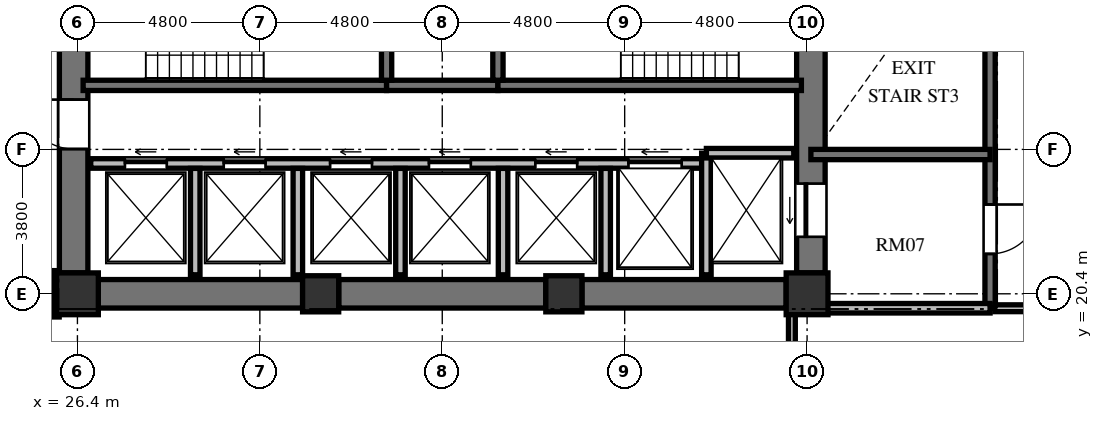
"""IFC4 building model, lengths in metres.
Left out: names, types, materials, properties, quantities, classifications, styles, units other than length and angle.
Written with IfcOpenShell. Run it as: python <this file> out.ifc"""

import sys

from ifc_helpers import new_model, si_unit, direction, frame, frame_2d, origin, origin_2d, place, context, subcontext, project, spatial, rectangle, extrude, element, fill, save


model = new_model("IFC4")
c1 = context("Model", 3, precision=1e-05, world=origin(), true_north=direction((0.0, 1.0)))
c2 = subcontext(c1, "Body", "Model", "MODEL_VIEW")
j1 = project(units=[si_unit("LENGTHUNIT", "METRE"), si_unit("PLANEANGLEUNIT", "RADIAN")], contexts=[c1])
p1 = place(None, origin())
s1 = spatial("IfcSite", under=j1, at=p1, CompositionType="ELEMENT")
p2 = place(p1, origin())
s2 = spatial("IfcBuilding", under=s1, at=p2, CompositionType="ELEMENT")
p3 = place(p2, frame((0.0, 0.0, 96.336)))
s3 = spatial("IfcBuildingStorey", under=s2, at=p3, CompositionType="ELEMENT", Elevation=96.336)
p4 = place(p3, frame((26.4, 20.4, 0.0), z_axis=(0.0, 0.0, 1.0), x_axis=(1.0, 0.0, 0.0)))
e1 = element("IfcColumn", 1, at=p4, inside=s3, PredefinedType="COLUMN", context=c2, shape_type="SweptSolid", body=[
    extrude(rectangle(XDim=1.1, YDim=1.1, at=origin_2d()), origin(), (0.0, 0.0, 1.0), 3.648),
])
for number, where, z_axis, x_axis in (
    (2, (32.8, 20.4, 0.0), (0.0, 0.0, 1.0), (1.0, 0.0, 0.0)),
    (3, (39.2, 20.4, 0.0), (0.0, 0.0, 1.0), (1.0, 0.0, 0.0)),
):
    element("IfcColumn", number, at=place(p3, frame(where, z_axis=z_axis, x_axis=x_axis)), inside=s3, PredefinedType="COLUMN", context=c2, shape_type="SweptSolid", body=[
        extrude(rectangle(XDim=0.95, YDim=0.95, at=origin_2d()), origin(), (0.0, 0.0, 1.0), 3.648),
    ])
p5 = place(p3, frame((45.6, 20.4, 0.0), z_axis=(0.0, 0.0, 1.0), x_axis=(1.0, 0.0, 0.0)))
e4 = element("IfcColumn", 4, at=p5, inside=s3, PredefinedType="COLUMN", context=c2, shape_type="SweptSolid", body=[
    extrude(rectangle(XDim=1.1, YDim=1.1, at=origin_2d()), origin(), (0.0, 0.0, 1.0), 3.648),
])
p6 = place(p3, frame((26.3, 20.95, 0.0), z_axis=(0.0, 0.0, 1.0), x_axis=(0.0, 1.0, 0.0)))
e5 = element("IfcWall", 5, at=p6, inside=s3, PredefinedType="SHEAR", context=c2, shape_type="SweptSolid", body=[
    extrude(rectangle(XDim=14.1, YDim=0.75, at=frame_2d((7.05, 0.0))), origin(), (0.0, 0.0, 1.0), 3.648),
])
p7 = place(p6, frame((6.5, 0.0, 0.0)))
e6 = element("IfcOpeningElement", 6, at=p7, cuts=e5, PredefinedType="OPENING", context=c2, shape_type="SweptSolid", body=[
    extrude(rectangle(XDim=1.2, YDim=2.15, at=frame_2d((0.6, 1.075))), frame((0.0, 0.385, 0.0), z_axis=(0.0, -1.0, 0.0), x_axis=(1.0, 0.0, 0.0)), (0.0, 0.0, 1.0), 0.77),
])
p8 = place(p6, frame((9.6, 0.0, 0.0)))
e7 = element("IfcOpeningElement", 7, at=p8, cuts=e5, PredefinedType="OPENING", context=c2, shape_type="SweptSolid", body=[
    extrude(rectangle(XDim=1.3, YDim=2.2, at=frame_2d((0.65, 1.1))), frame((0.0, 0.385, 0.0), z_axis=(0.0, -1.0, 0.0), x_axis=(1.0, 0.0, 0.0)), (0.0, 0.0, 1.0), 0.77),
])
p9 = place(p6, frame((3.26, 0.0, 0.0)))
e8 = element("IfcOpeningElement", 8, at=p9, cuts=e5, PredefinedType="OPENING", context=c2, shape_type="SweptSolid", body=[
    extrude(rectangle(XDim=1.3, YDim=2.2, at=frame_2d((0.65, 1.1))), frame((0.0, 0.385, 0.0), z_axis=(0.0, -1.0, 0.0), x_axis=(1.0, 0.0, 0.0)), (0.0, 0.0, 1.0), 0.77),
])
p10 = place(p3, frame((45.7, 20.95, 0.0), z_axis=(0.0, 0.0, 1.0), x_axis=(0.0, 1.0, 0.0)))
e9 = element("IfcWall", 9, at=p10, inside=s3, PredefinedType="SHEAR", context=c2, shape_type="SweptSolid", body=[
    extrude(rectangle(XDim=14.1, YDim=0.75, at=frame_2d((7.05, 0.0))), origin(), (0.0, 0.0, 1.0), 3.648),
])
p11 = place(p10, frame((11.75, 0.0, 0.0)))
e10 = element("IfcOpeningElement", 10, at=p11, cuts=e9, PredefinedType="OPENING", context=c2, shape_type="SweptSolid", body=[
    extrude(rectangle(XDim=1.4, YDim=2.3, at=frame_2d((0.7, 1.15))), frame((0.0, 0.385, 0.0), z_axis=(0.0, -1.0, 0.0), x_axis=(1.0, 0.0, 0.0)), (0.0, 0.0, 1.0), 0.77),
])
p12 = place(p10, frame((0.95, 0.0, 0.0)))
e11 = element("IfcOpeningElement", 11, at=p12, cuts=e9, PredefinedType="OPENING", context=c2, shape_type="SweptSolid", body=[
    extrude(rectangle(XDim=1.4, YDim=2.3, at=frame_2d((0.7, 1.15))), frame((0.0, 0.385, 0.0), z_axis=(0.0, -1.0, 0.0), x_axis=(1.0, 0.0, 0.0)), (0.0, 0.0, 1.0), 0.77),
])
p13 = place(p3, frame((26.95, 20.4, 0.0), z_axis=(0.0, 0.0, 1.0), x_axis=(1.0, 0.0, 0.0)))
e12 = element("IfcWall", 12, at=p13, inside=s3, PredefinedType="SHEAR", context=c2, shape_type="SweptSolid", body=[
    extrude(rectangle(XDim=5.375, YDim=0.75, at=frame_2d((2.688, 0.0))), origin(), (0.0, 0.0, 1.0), 3.648),
])
p14 = place(p3, frame((33.275, 20.4, 0.0), z_axis=(0.0, 0.0, 1.0), x_axis=(1.0, 0.0, 0.0)))
e13 = element("IfcWall", 13, at=p14, inside=s3, PredefinedType="SHEAR", context=c2, shape_type="SweptSolid", body=[
    extrude(rectangle(XDim=5.45, YDim=0.75, at=frame_2d((2.725, 0.0))), origin(), (0.0, 0.0, 1.0), 3.648),
])
p15 = place(p3, frame((39.675, 20.4, 0.0), z_axis=(0.0, 0.0, 1.0), x_axis=(1.0, 0.0, 0.0)))
e14 = element("IfcWall", 14, at=p15, inside=s3, PredefinedType="SHEAR", context=c2, shape_type="SweptSolid", body=[
    extrude(rectangle(XDim=5.375, YDim=0.75, at=frame_2d((2.688, 0.0))), origin(), (0.0, 0.0, 1.0), 3.648),
])
p16 = place(p3, frame((26.55, 25.885, 0.0), z_axis=(0.0, 0.0, 1.0), x_axis=(1.0, 0.0, 0.0)))
e15 = element("IfcWall", 15, at=p16, inside=s3, PredefinedType="SHEAR", context=c2, shape_type="SweptSolid", body=[
    extrude(rectangle(XDim=7.985, YDim=0.27, at=frame_2d((3.992, 0.0))), origin(), (0.0, 0.0, 1.0), 3.648),
])
p17 = place(p3, frame((34.535, 25.885, 0.0), z_axis=(0.0, 0.0, 1.0), x_axis=(1.0, 0.0, 0.0)))
e16 = element("IfcWall", 16, at=p17, inside=s3, PredefinedType="SHEAR", context=c2, shape_type="SweptSolid", body=[
    extrude(rectangle(XDim=2.93, YDim=0.27, at=frame_2d((1.465, 0.0))), origin(), (0.0, 0.0, 1.0), 3.648),
])
p18 = place(p3, frame((37.465, 25.885, 0.0), z_axis=(0.0, 0.0, 1.0), x_axis=(1.0, 0.0, 0.0)))
e17 = element("IfcWall", 17, at=p18, inside=s3, PredefinedType="SHEAR", context=c2, shape_type="SweptSolid", body=[
    extrude(rectangle(XDim=7.985, YDim=0.27, at=frame_2d((3.992, 0.0))), origin(), (0.0, 0.0, 1.0), 3.648),
])
for number, where, z_axis, x_axis in (
    (18, (34.535, 26.02, 0.0), (0.0, 0.0, 1.0), (0.0, 1.0, 0.0)),
    (19, (37.465, 26.02, 0.0), (0.0, 0.0, 1.0), (0.0, 1.0, 0.0)),
):
    element("IfcWall", number, at=place(p3, frame(where, z_axis=z_axis, x_axis=x_axis)), inside=s3, PredefinedType="SHEAR", context=c2, shape_type="SweptSolid", body=[
        extrude(rectangle(XDim=4.08, YDim=0.27, at=frame_2d((2.04, 0.0))), origin(), (0.0, 0.0, 1.0), 3.648),
    ])
p19 = place(p3, frame((26.75, 23.83, 0.0), z_axis=(0.0, 0.0, 1.0), x_axis=(1.0, 0.0, 0.0)))
e20 = element("IfcWall", 20, at=p19, inside=s3, PredefinedType="SOLIDWALL", context=c2, shape_type="SweptSolid", body=[
    extrude(rectangle(XDim=16.2, YDim=0.25, at=frame_2d((8.1, 0.0))), origin(), (0.0, 0.0, 1.0), 3.428),
])
p20 = place(p19, frame((0.9, 0.0, 0.0)))
e21 = element("IfcOpeningElement", 21, at=p20, cuts=e20, PredefinedType="OPENING", context=c2, shape_type="SweptSolid", body=[
    extrude(rectangle(XDim=1.1, YDim=2.2, at=frame_2d((0.55, 1.1))), frame((0.0, 0.135, 0.0), z_axis=(0.0, -1.0, 0.0), x_axis=(1.0, 0.0, 0.0)), (0.0, 0.0, 1.0), 0.27),
])
p21 = place(p19, frame((3.5, 0.0, 0.0)))
e22 = element("IfcOpeningElement", 22, at=p21, cuts=e20, PredefinedType="OPENING", context=c2, shape_type="SweptSolid", body=[
    extrude(rectangle(XDim=1.1, YDim=2.2, at=frame_2d((0.55, 1.1))), frame((0.0, 0.135, 0.0), z_axis=(0.0, -1.0, 0.0), x_axis=(1.0, 0.0, 0.0)), (0.0, 0.0, 1.0), 0.27),
])
p22 = place(p19, frame((6.3, 0.0, 0.0)))
e23 = element("IfcOpeningElement", 23, at=p22, cuts=e20, PredefinedType="OPENING", context=c2, shape_type="SweptSolid", body=[
    extrude(rectangle(XDim=1.1, YDim=2.2, at=frame_2d((0.55, 1.1))), frame((0.0, 0.135, 0.0), z_axis=(0.0, -1.0, 0.0), x_axis=(1.0, 0.0, 0.0)), (0.0, 0.0, 1.0), 0.27),
])
p23 = place(p19, frame((8.9, 0.0, 0.0)))
e24 = element("IfcOpeningElement", 24, at=p23, cuts=e20, PredefinedType="OPENING", context=c2, shape_type="SweptSolid", body=[
    extrude(rectangle(XDim=1.1, YDim=2.2, at=frame_2d((0.55, 1.1))), frame((0.0, 0.135, 0.0), z_axis=(0.0, -1.0, 0.0), x_axis=(1.0, 0.0, 0.0)), (0.0, 0.0, 1.0), 0.27),
])
p24 = place(p19, frame((11.7, 0.0, 0.0)))
e25 = element("IfcOpeningElement", 25, at=p24, cuts=e20, PredefinedType="OPENING", context=c2, shape_type="SweptSolid", body=[
    extrude(rectangle(XDim=1.1, YDim=2.2, at=frame_2d((0.55, 1.1))), frame((0.0, 0.135, 0.0), z_axis=(0.0, -1.0, 0.0), x_axis=(1.0, 0.0, 0.0)), (0.0, 0.0, 1.0), 0.27),
])
p25 = place(p19, frame((14.15, 0.0, 0.0)))
e26 = element("IfcOpeningElement", 26, at=p25, cuts=e20, PredefinedType="OPENING", context=c2, shape_type="SweptSolid", body=[
    extrude(rectangle(XDim=1.4, YDim=2.3, at=frame_2d((0.7, 1.15))), frame((0.0, 0.135, 0.0), z_axis=(0.0, -1.0, 0.0), x_axis=(1.0, 0.0, 0.0)), (0.0, 0.0, 1.0), 0.27),
])
p26 = place(p3, frame((42.95, 20.9, 0.0), z_axis=(0.0, 0.0, 1.0), x_axis=(0.0, 1.0, 0.0)))
e27 = element("IfcWall", 27, at=p26, inside=s3, PredefinedType="SOLIDWALL", context=c2, shape_type="SweptSolid", body=[
    extrude(rectangle(XDim=3.2, YDim=0.25, at=frame_2d((1.6, 0.0))), origin(), (0.0, 0.0, 1.0), 3.428),
])
p27 = place(p3, frame((42.95, 24.1, 0.0), z_axis=(0.0, 0.0, 1.0), x_axis=(1.0, 0.0, 0.0)))
e28 = element("IfcWall", 28, at=p27, inside=s3, PredefinedType="SOLIDWALL", context=c2, shape_type="SweptSolid", body=[
    extrude(rectangle(XDim=2.3, YDim=0.25, at=frame_2d((1.15, 0.0))), origin(), (0.0, 0.0, 1.0), 3.428),
])
for number, where, z_axis, x_axis in (
    (29, (29.5, 20.9, 0.0), (0.0, 0.0, 1.0), (0.0, 1.0, 0.0)),
    (30, (32.2, 20.9, 0.0), (0.0, 0.0, 1.0), (0.0, 1.0, 0.0)),
    (31, (34.9, 20.9, 0.0), (0.0, 0.0, 1.0), (0.0, 1.0, 0.0)),
    (32, (37.6, 20.9, 0.0), (0.0, 0.0, 1.0), (0.0, 1.0, 0.0)),
    (33, (40.3, 20.9, 0.0), (0.0, 0.0, 1.0), (0.0, 1.0, 0.0)),
):
    element("IfcWall", number, at=place(p3, frame(where, z_axis=z_axis, x_axis=x_axis)), inside=s3, PredefinedType="SOLIDWALL", context=c2, shape_type="SweptSolid", body=[
        extrude(rectangle(XDim=2.8, YDim=0.25, at=frame_2d((1.4, 0.0))), origin(), (0.0, 0.0, 1.0), 3.428),
    ])
p28 = place(p3, frame((50.415, 35.845, 0.0), z_axis=(0.0, 0.0, 1.0), x_axis=(0.0, -1.0, 0.0)))
e34 = element("IfcWall", 34, at=p28, inside=s3, PredefinedType="SHEAR", context=c2, shape_type="SweptSolid", body=[
    extrude(rectangle(XDim=15.825, YDim=0.27, at=frame_2d((7.913, 0.0))), origin(), (0.0, 0.0, 1.0), 3.648),
])
p29 = place(p28, frame((4.445, 0.0, 0.0)))
e35 = element("IfcOpeningElement", 35, at=p29, cuts=e34, PredefinedType="OPENING", context=c2, shape_type="SweptSolid", body=[
    extrude(rectangle(XDim=1.2, YDim=2.15, at=frame_2d((0.6, 1.075))), frame((0.0, 0.145, 0.0), z_axis=(0.0, -1.0, 0.0), x_axis=(1.0, 0.0, 0.0)), (0.0, 0.0, 1.0), 0.29),
])
p30 = place(p28, frame((1.295, 0.0, 0.0)))
e36 = element("IfcOpeningElement", 36, at=p30, cuts=e34, PredefinedType="OPENING", context=c2, shape_type="SweptSolid", body=[
    extrude(rectangle(XDim=1.3, YDim=2.2, at=frame_2d((0.65, 1.1))), frame((0.0, 0.145, 0.0), z_axis=(0.0, -1.0, 0.0), x_axis=(1.0, 0.0, 0.0)), (0.0, 0.0, 1.0), 0.29),
])
p31 = place(p28, frame((13.095, 0.0, 0.0)))
e37 = element("IfcOpeningElement", 37, at=p31, cuts=e34, PredefinedType="OPENING", context=c2, shape_type="SweptSolid", body=[
    extrude(rectangle(XDim=1.3, YDim=2.2, at=frame_2d((0.65, 1.1))), frame((0.0, 0.145, 0.0), z_axis=(0.0, -1.0, 0.0), x_axis=(1.0, 0.0, 0.0)), (0.0, 0.0, 1.0), 0.29),
])
p32 = place(p3, frame((45.7, 24.065, 0.0), z_axis=(0.0, 0.0, 1.0), x_axis=(1.0, 0.0, 0.0)))
e38 = element("IfcWall", 38, at=p32, inside=s3, PredefinedType="SHEAR", context=c2, shape_type="SweptSolid", body=[
    extrude(rectangle(XDim=4.715, YDim=0.27, at=frame_2d((2.357, 0.0))), origin(), (0.0, 0.0, 1.0), 3.648),
])
p33 = place(p3, frame((45.7, 20.02, 0.0), z_axis=(0.0, 0.0, 1.0), x_axis=(1.0, 0.0, 0.0)))
e39 = element("IfcWall", 39, at=p33, inside=s3, PredefinedType="SOLIDWALL", context=c2, shape_type="SweptSolid", body=[
    extrude(rectangle(XDim=4.715, YDim=0.25, at=frame_2d((2.357, 0.0))), origin(), (0.0, 0.0, 1.0), 3.428),
])
p34 = place(p3, frame((53.19, 20.02, 0.0), z_axis=(0.0, 0.0, 1.0), x_axis=(-1.0, 0.0, 0.0)))
e40 = element("IfcWall", 40, at=p34, inside=s3, PredefinedType="PARTITIONING", context=c2, shape_type="SweptSolid", body=[
    extrude(rectangle(XDim=2.65, YDim=0.18, at=frame_2d((1.325, 0.0))), origin(), (0.0, 0.0, 1.0), 3.428),
])
p35 = place(p3, frame((25.83, 21.01, 0.0), z_axis=(0.0, 0.0, 1.0), x_axis=(0.0, -1.0, 0.0)))
e41 = element("IfcWall", 41, at=p35, inside=s3, PredefinedType="PARTITIONING", context=c2, shape_type="SweptSolid", body=[
    extrude(rectangle(XDim=1.22, YDim=0.18, at=frame_2d((0.61, 0.0))), origin(), (0.0, 0.0, 1.0), 3.428),
])
p36 = place(p3, frame((45.2, 19.91, 0.0), z_axis=(0.0, 0.0, 1.0), x_axis=(0.0, -1.0, 0.0)))
e42 = element("IfcWall", 42, at=p36, inside=s3, PredefinedType="PARTITIONING", context=c2, shape_type="SweptSolid", body=[
    extrude(rectangle(XDim=2.55, YDim=0.18, at=frame_2d((1.275, 0.0))), origin(), (0.0, 0.0, 1.0), 3.428),
])
p37 = place(p9, origin())
e43 = element("IfcDoor", 43, at=p37, inside=s3, OperationType="SINGLE_SWING_RIGHT", PredefinedType="DOOR", context=c2, shape_type="SweptSolid", body=[
    extrude(rectangle(XDim=1.3, YDim=2.2, at=frame_2d((0.65, 1.1))), frame((0.0, 0.025, 0.0), z_axis=(0.0, -1.0, 0.0), x_axis=(1.0, 0.0, 0.0)), (0.0, 0.0, 1.0), 0.05),
])
fill(e8, e43)
p38 = place(p20, origin())
e44 = element("IfcDoor", 44, at=p38, inside=s3, OperationType="SLIDING_TO_LEFT", PredefinedType="DOOR", context=c2, shape_type="SweptSolid", body=[
    extrude(rectangle(XDim=1.1, YDim=2.2, at=frame_2d((0.55, 1.1))), frame((0.0, 0.025, 0.0), z_axis=(0.0, -1.0, 0.0), x_axis=(1.0, 0.0, 0.0)), (0.0, 0.0, 1.0), 0.05),
])
fill(e21, e44)
p39 = place(p21, origin())
e45 = element("IfcDoor", 45, at=p39, inside=s3, OperationType="SLIDING_TO_LEFT", PredefinedType="DOOR", context=c2, shape_type="SweptSolid", body=[
    extrude(rectangle(XDim=1.1, YDim=2.2, at=frame_2d((0.55, 1.1))), frame((0.0, 0.025, 0.0), z_axis=(0.0, -1.0, 0.0), x_axis=(1.0, 0.0, 0.0)), (0.0, 0.0, 1.0), 0.05),
])
fill(e22, e45)
p40 = place(p22, origin())
e46 = element("IfcDoor", 46, at=p40, inside=s3, OperationType="SLIDING_TO_LEFT", PredefinedType="DOOR", context=c2, shape_type="SweptSolid", body=[
    extrude(rectangle(XDim=1.1, YDim=2.2, at=frame_2d((0.55, 1.1))), frame((0.0, 0.025, 0.0), z_axis=(0.0, -1.0, 0.0), x_axis=(1.0, 0.0, 0.0)), (0.0, 0.0, 1.0), 0.05),
])
fill(e23, e46)
p41 = place(p23, origin())
e47 = element("IfcDoor", 47, at=p41, inside=s3, OperationType="SLIDING_TO_LEFT", PredefinedType="DOOR", context=c2, shape_type="SweptSolid", body=[
    extrude(rectangle(XDim=1.1, YDim=2.2, at=frame_2d((0.55, 1.1))), frame((0.0, 0.025, 0.0), z_axis=(0.0, -1.0, 0.0), x_axis=(1.0, 0.0, 0.0)), (0.0, 0.0, 1.0), 0.05),
])
fill(e24, e47)
p42 = place(p24, origin())
e48 = element("IfcDoor", 48, at=p42, inside=s3, OperationType="SLIDING_TO_LEFT", PredefinedType="DOOR", context=c2, shape_type="SweptSolid", body=[
    extrude(rectangle(XDim=1.1, YDim=2.2, at=frame_2d((0.55, 1.1))), frame((0.0, 0.025, 0.0), z_axis=(0.0, -1.0, 0.0), x_axis=(1.0, 0.0, 0.0)), (0.0, 0.0, 1.0), 0.05),
])
fill(e25, e48)
p43 = place(p12, origin())
e49 = element("IfcDoor", 49, at=p43, inside=s3, OperationType="SLIDING_TO_LEFT", PredefinedType="DOOR", context=c2, shape_type="SweptSolid", body=[
    extrude(rectangle(XDim=1.4, YDim=2.3, at=frame_2d((0.7, 1.15))), frame((0.0, 0.025, 0.0), z_axis=(0.0, -1.0, 0.0), x_axis=(1.0, 0.0, 0.0)), (0.0, 0.0, 1.0), 0.05),
])
fill(e11, e49)
p44 = place(p25, origin())
e50 = element("IfcDoor", 50, at=p44, inside=s3, OperationType="SLIDING_TO_LEFT", PredefinedType="DOOR", context=c2, shape_type="SweptSolid", body=[
    extrude(rectangle(XDim=1.4, YDim=2.3, at=frame_2d((0.7, 1.15))), frame((0.0, 0.025, 0.0), z_axis=(0.0, -1.0, 0.0), x_axis=(1.0, 0.0, 0.0)), (0.0, 0.0, 1.0), 0.05),
])
fill(e26, e50)
p45 = place(p31, origin())
e51 = element("IfcDoor", 51, at=p45, inside=s3, OperationType="SINGLE_SWING_LEFT", PredefinedType="DOOR", context=c2, shape_type="SweptSolid", body=[
    extrude(rectangle(XDim=1.3, YDim=2.2, at=frame_2d((0.65, 1.1))), frame((0.0, 0.025, 0.0), z_axis=(0.0, -1.0, 0.0), x_axis=(1.0, 0.0, 0.0)), (0.0, 0.0, 1.0), 0.05),
])
fill(e37, e51)
save(model, sys.argv[1])
